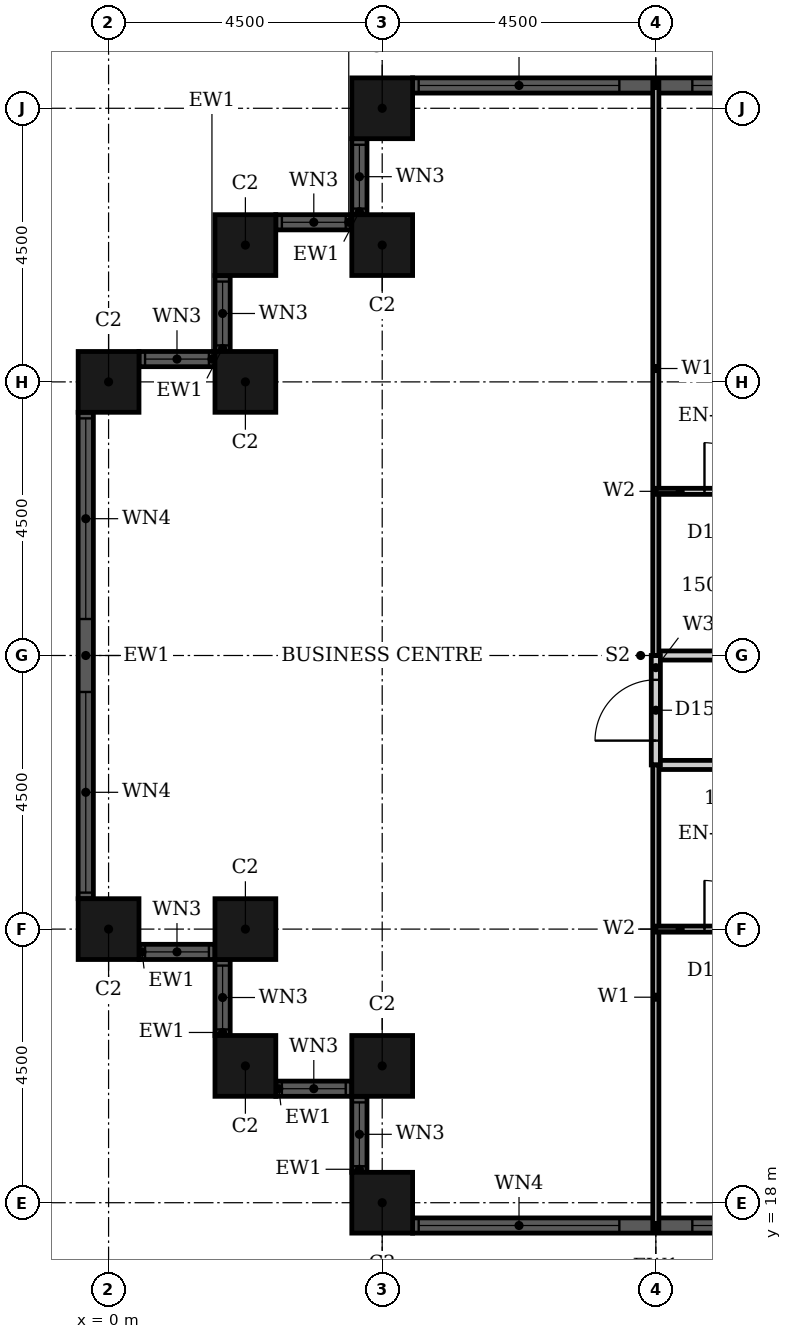
"""IFC4 building model, lengths in metres.
Left out: names, types, materials, properties, quantities, classifications, styles, units other than length and angle.
Written with IfcOpenShell. Run it as: python <this file> out.ifc"""

import sys

from ifc_helpers import new_model, si_unit, direction, frame, frame_2d, origin, origin_2d, place, context, subcontext, project, spatial, rectangle, hollow_rectangle, extrude, element, fill, save


model = new_model("IFC4")
c1 = context("Model", 3, precision=1e-05, world=origin(), true_north=direction((0.0, 1.0)))
c2 = subcontext(c1, "Body", "Model", "MODEL_VIEW")
j1 = project(units=[si_unit("LENGTHUNIT", "METRE"), si_unit("PLANEANGLEUNIT", "RADIAN")], contexts=[c1])
p1 = place(None, origin())
s1 = spatial("IfcSite", under=j1, at=p1, CompositionType="ELEMENT")
p2 = place(p1, origin())
s2 = spatial("IfcBuilding", under=s1, at=p2, CompositionType="ELEMENT")
p3 = place(p2, frame((0.0, 0.0, 67.2)))
s3 = spatial("IfcBuildingStorey", under=s2, at=p3, CompositionType="ELEMENT", Elevation=67.2)
for number, where, z_axis, x_axis in (
    (1, (4.5, 36.0, 0.0), (0.0, 0.0, 1.0), (1.0, 0.0, 0.0)),
    (2, (4.5, 33.75, 0.0), (0.0, 0.0, 1.0), (1.0, 0.0, 0.0)),
    (3, (2.25, 33.75, 0.0), (0.0, 0.0, 1.0), (1.0, 0.0, 0.0)),
    (4, (2.25, 31.5, 0.0), (0.0, 0.0, 1.0), (1.0, 0.0, 0.0)),
    (5, (0.0, 31.5, 0.0), (0.0, 0.0, 1.0), (1.0, 0.0, 0.0)),
    (6, (0.0, 22.5, 0.0), (0.0, 0.0, 1.0), (1.0, 0.0, 0.0)),
    (7, (2.25, 22.5, 0.0), (0.0, 0.0, 1.0), (1.0, 0.0, 0.0)),
    (8, (2.25, 20.25, 0.0), (0.0, 0.0, 1.0), (1.0, 0.0, 0.0)),
    (9, (4.5, 20.25, 0.0), (0.0, 0.0, 1.0), (1.0, 0.0, 0.0)),
    (10, (4.5, 18.0, 0.0), (0.0, 0.0, 1.0), (1.0, 0.0, 0.0)),
):
    element("IfcColumn", number, at=place(p3, frame(where, z_axis=z_axis, x_axis=x_axis)), inside=s3, PredefinedType="COLUMN", context=c2, shape_type="SweptSolid", body=[
        extrude(hollow_rectangle(XDim=1.0, YDim=1.0, WallThickness=0.032, at=origin_2d()), origin(), (0.0, 0.0, 1.0), 3.6),
    ])
p4 = place(p3, frame((13.0, 36.375, 0.0), z_axis=(0.0, 0.0, 1.0), x_axis=(-1.0, 0.0, 0.0)))
e11 = element("IfcWall", 11, at=p4, inside=s3, PredefinedType="SOLIDWALL", context=c2, shape_type="SweptSolid", body=[
    extrude(rectangle(XDim=8.0, YDim=0.25, at=frame_2d((4.0, 0.0))), origin(), (0.0, 0.0, 1.0), 3.6),
])
p5 = place(p4, frame((0.1, 0.0, 0.9)))
e12 = element("IfcOpeningElement", 12, at=p5, cuts=e11, PredefinedType="OPENING", context=c2, shape_type="SweptSolid", body=[
    extrude(rectangle(XDim=3.3, YDim=2.08, at=frame_2d((1.65, 1.04))), frame((0.0, 0.135, 0.0), z_axis=(0.0, -1.0, 0.0), x_axis=(1.0, 0.0, 0.0)), (0.0, 0.0, 1.0), 0.27),
])
p6 = place(p4, frame((4.6, 0.0, 0.9)))
e13 = element("IfcOpeningElement", 13, at=p6, cuts=e11, PredefinedType="OPENING", context=c2, shape_type="SweptSolid", body=[
    extrude(rectangle(XDim=3.3, YDim=2.08, at=frame_2d((1.65, 1.04))), frame((0.0, 0.135, 0.0), z_axis=(0.0, -1.0, 0.0), x_axis=(1.0, 0.0, 0.0)), (0.0, 0.0, 1.0), 0.27),
])
p7 = place(p3, frame((4.125, 35.5, 0.0), z_axis=(0.0, 0.0, 1.0), x_axis=(0.0, -1.0, 0.0)))
e14 = element("IfcWall", 14, at=p7, inside=s3, PredefinedType="SOLIDWALL", context=c2, shape_type="SweptSolid", body=[
    extrude(rectangle(XDim=1.25, YDim=0.25, at=frame_2d((0.625, 0.0))), origin(), (0.0, 0.0, 1.0), 3.6),
])
p8 = place(p7, frame((0.1, 0.0, 0.9)))
e15 = element("IfcOpeningElement", 15, at=p8, cuts=e14, PredefinedType="OPENING", context=c2, shape_type="SweptSolid", body=[
    extrude(rectangle(XDim=1.05, YDim=2.08, at=frame_2d((0.525, 1.04))), frame((0.0, 0.135, 0.0), z_axis=(0.0, -1.0, 0.0), x_axis=(1.0, 0.0, 0.0)), (0.0, 0.0, 1.0), 0.27),
])
p9 = place(p3, frame((4.0, 34.125, 0.0), z_axis=(0.0, 0.0, 1.0), x_axis=(-1.0, 0.0, 0.0)))
e16 = element("IfcWall", 16, at=p9, inside=s3, PredefinedType="SOLIDWALL", context=c2, shape_type="SweptSolid", body=[
    extrude(rectangle(XDim=1.25, YDim=0.25, at=frame_2d((0.625, 0.0))), origin(), (0.0, 0.0, 1.0), 3.6),
])
p10 = place(p9, frame((0.1, 0.0, 0.9)))
e17 = element("IfcOpeningElement", 17, at=p10, cuts=e16, PredefinedType="OPENING", context=c2, shape_type="SweptSolid", body=[
    extrude(rectangle(XDim=1.05, YDim=2.08, at=frame_2d((0.525, 1.04))), frame((0.0, 0.135, 0.0), z_axis=(0.0, -1.0, 0.0), x_axis=(1.0, 0.0, 0.0)), (0.0, 0.0, 1.0), 0.27),
])
p11 = place(p3, frame((1.875, 33.25, 0.0), z_axis=(0.0, 0.0, 1.0), x_axis=(0.0, -1.0, 0.0)))
e18 = element("IfcWall", 18, at=p11, inside=s3, PredefinedType="SOLIDWALL", context=c2, shape_type="SweptSolid", body=[
    extrude(rectangle(XDim=1.25, YDim=0.25, at=frame_2d((0.625, 0.0))), origin(), (0.0, 0.0, 1.0), 3.6),
])
p12 = place(p11, frame((0.1, 0.0, 0.9)))
e19 = element("IfcOpeningElement", 19, at=p12, cuts=e18, PredefinedType="OPENING", context=c2, shape_type="SweptSolid", body=[
    extrude(rectangle(XDim=1.05, YDim=2.08, at=frame_2d((0.525, 1.04))), frame((0.0, 0.135, 0.0), z_axis=(0.0, -1.0, 0.0), x_axis=(1.0, 0.0, 0.0)), (0.0, 0.0, 1.0), 0.27),
])
p13 = place(p3, frame((1.75, 31.875, 0.0), z_axis=(0.0, 0.0, 1.0), x_axis=(-1.0, 0.0, 0.0)))
e20 = element("IfcWall", 20, at=p13, inside=s3, PredefinedType="SOLIDWALL", context=c2, shape_type="SweptSolid", body=[
    extrude(rectangle(XDim=1.25, YDim=0.25, at=frame_2d((0.625, 0.0))), origin(), (0.0, 0.0, 1.0), 3.6),
])
p14 = place(p13, frame((0.1, 0.0, 0.9)))
e21 = element("IfcOpeningElement", 21, at=p14, cuts=e20, PredefinedType="OPENING", context=c2, shape_type="SweptSolid", body=[
    extrude(rectangle(XDim=1.05, YDim=2.08, at=frame_2d((0.525, 1.04))), frame((0.0, 0.135, 0.0), z_axis=(0.0, -1.0, 0.0), x_axis=(1.0, 0.0, 0.0)), (0.0, 0.0, 1.0), 0.27),
])
p15 = place(p3, frame((-0.375, 31.0, 0.0), z_axis=(0.0, 0.0, 1.0), x_axis=(0.0, -1.0, 0.0)))
e22 = element("IfcWall", 22, at=p15, inside=s3, PredefinedType="SOLIDWALL", context=c2, shape_type="SweptSolid", body=[
    extrude(rectangle(XDim=8.0, YDim=0.25, at=frame_2d((4.0, 0.0))), origin(), (0.0, 0.0, 1.0), 3.6),
])
p16 = place(p15, frame((0.1, 0.0, 0.9)))
e23 = element("IfcOpeningElement", 23, at=p16, cuts=e22, PredefinedType="OPENING", context=c2, shape_type="SweptSolid", body=[
    extrude(rectangle(XDim=3.3, YDim=2.08, at=frame_2d((1.65, 1.04))), frame((0.0, 0.135, 0.0), z_axis=(0.0, -1.0, 0.0), x_axis=(1.0, 0.0, 0.0)), (0.0, 0.0, 1.0), 0.27),
])
p17 = place(p15, frame((4.6, 0.0, 0.9)))
e24 = element("IfcOpeningElement", 24, at=p17, cuts=e22, PredefinedType="OPENING", context=c2, shape_type="SweptSolid", body=[
    extrude(rectangle(XDim=3.3, YDim=2.08, at=frame_2d((1.65, 1.04))), frame((0.0, 0.135, 0.0), z_axis=(0.0, -1.0, 0.0), x_axis=(1.0, 0.0, 0.0)), (0.0, 0.0, 1.0), 0.27),
])
p18 = place(p3, frame((0.5, 22.125, 0.0), z_axis=(0.0, 0.0, 1.0), x_axis=(1.0, 0.0, 0.0)))
e25 = element("IfcWall", 25, at=p18, inside=s3, PredefinedType="SOLIDWALL", context=c2, shape_type="SweptSolid", body=[
    extrude(rectangle(XDim=1.25, YDim=0.25, at=frame_2d((0.625, 0.0))), origin(), (0.0, 0.0, 1.0), 3.6),
])
p19 = place(p18, frame((0.1, 0.0, 0.9)))
e26 = element("IfcOpeningElement", 26, at=p19, cuts=e25, PredefinedType="OPENING", context=c2, shape_type="SweptSolid", body=[
    extrude(rectangle(XDim=1.05, YDim=2.08, at=frame_2d((0.525, 1.04))), frame((0.0, 0.135, 0.0), z_axis=(0.0, -1.0, 0.0), x_axis=(1.0, 0.0, 0.0)), (0.0, 0.0, 1.0), 0.27),
])
p20 = place(p3, frame((1.875, 22.0, 0.0), z_axis=(0.0, 0.0, 1.0), x_axis=(0.0, -1.0, 0.0)))
e27 = element("IfcWall", 27, at=p20, inside=s3, PredefinedType="SOLIDWALL", context=c2, shape_type="SweptSolid", body=[
    extrude(rectangle(XDim=1.25, YDim=0.25, at=frame_2d((0.625, 0.0))), origin(), (0.0, 0.0, 1.0), 3.6),
])
p21 = place(p20, frame((0.1, 0.0, 0.9)))
e28 = element("IfcOpeningElement", 28, at=p21, cuts=e27, PredefinedType="OPENING", context=c2, shape_type="SweptSolid", body=[
    extrude(rectangle(XDim=1.05, YDim=2.08, at=frame_2d((0.525, 1.04))), frame((0.0, 0.135, 0.0), z_axis=(0.0, -1.0, 0.0), x_axis=(1.0, 0.0, 0.0)), (0.0, 0.0, 1.0), 0.27),
])
p22 = place(p3, frame((2.75, 19.875, 0.0), z_axis=(0.0, 0.0, 1.0), x_axis=(1.0, 0.0, 0.0)))
e29 = element("IfcWall", 29, at=p22, inside=s3, PredefinedType="SOLIDWALL", context=c2, shape_type="SweptSolid", body=[
    extrude(rectangle(XDim=1.25, YDim=0.25, at=frame_2d((0.625, 0.0))), origin(), (0.0, 0.0, 1.0), 3.6),
])
p23 = place(p22, frame((0.1, 0.0, 0.9)))
e30 = element("IfcOpeningElement", 30, at=p23, cuts=e29, PredefinedType="OPENING", context=c2, shape_type="SweptSolid", body=[
    extrude(rectangle(XDim=1.05, YDim=2.08, at=frame_2d((0.525, 1.04))), frame((0.0, 0.135, 0.0), z_axis=(0.0, -1.0, 0.0), x_axis=(1.0, 0.0, 0.0)), (0.0, 0.0, 1.0), 0.27),
])
p24 = place(p3, frame((4.125, 19.75, 0.0), z_axis=(0.0, 0.0, 1.0), x_axis=(0.0, -1.0, 0.0)))
e31 = element("IfcWall", 31, at=p24, inside=s3, PredefinedType="SOLIDWALL", context=c2, shape_type="SweptSolid", body=[
    extrude(rectangle(XDim=1.25, YDim=0.25, at=frame_2d((0.625, 0.0))), origin(), (0.0, 0.0, 1.0), 3.6),
])
p25 = place(p24, frame((0.1, 0.0, 0.9)))
e32 = element("IfcOpeningElement", 32, at=p25, cuts=e31, PredefinedType="OPENING", context=c2, shape_type="SweptSolid", body=[
    extrude(rectangle(XDim=1.05, YDim=2.08, at=frame_2d((0.525, 1.04))), frame((0.0, 0.135, 0.0), z_axis=(0.0, -1.0, 0.0), x_axis=(1.0, 0.0, 0.0)), (0.0, 0.0, 1.0), 0.27),
])
p26 = place(p3, frame((5.0, 17.625, 0.0), z_axis=(0.0, 0.0, 1.0), x_axis=(1.0, 0.0, 0.0)))
e33 = element("IfcWall", 33, at=p26, inside=s3, PredefinedType="SOLIDWALL", context=c2, shape_type="SweptSolid", body=[
    extrude(rectangle(XDim=8.0, YDim=0.25, at=frame_2d((4.0, 0.0))), origin(), (0.0, 0.0, 1.0), 3.6),
])
p27 = place(p26, frame((0.1, 0.0, 0.9)))
e34 = element("IfcOpeningElement", 34, at=p27, cuts=e33, PredefinedType="OPENING", context=c2, shape_type="SweptSolid", body=[
    extrude(rectangle(XDim=3.3, YDim=2.08, at=frame_2d((1.65, 1.04))), frame((0.0, 0.135, 0.0), z_axis=(0.0, -1.0, 0.0), x_axis=(1.0, 0.0, 0.0)), (0.0, 0.0, 1.0), 0.27),
])
p28 = place(p26, frame((4.6, 0.0, 0.9)))
e35 = element("IfcOpeningElement", 35, at=p28, cuts=e33, PredefinedType="OPENING", context=c2, shape_type="SweptSolid", body=[
    extrude(rectangle(XDim=3.3, YDim=2.08, at=frame_2d((1.65, 1.04))), frame((0.0, 0.135, 0.0), z_axis=(0.0, -1.0, 0.0), x_axis=(1.0, 0.0, 0.0)), (0.0, 0.0, 1.0), 0.27),
])
p29 = place(p3, frame((9.0, 25.2, 0.0), z_axis=(0.0, 0.0, 1.0), x_axis=(1.0, 0.0, 0.0)))
e36 = element("IfcWall", 36, at=p29, inside=s3, PredefinedType="PARTITIONING", context=c2, shape_type="SweptSolid", body=[
    extrude(rectangle(XDim=7.2, YDim=0.15, at=frame_2d((3.6, 0.0))), origin(), (0.0, 0.0, 1.0), 3.3),
])
p30 = place(p29, frame((2.95, 0.0, 0.0)))
e37 = element("IfcOpeningElement", 37, at=p30, cuts=e36, PredefinedType="OPENING", context=c2, shape_type="SweptSolid", body=[
    extrude(rectangle(XDim=1.0, YDim=2.1, at=frame_2d((0.5, 1.05))), frame((0.0, 0.085, 0.0), z_axis=(0.0, -1.0, 0.0), x_axis=(1.0, 0.0, 0.0)), (0.0, 0.0, 1.0), 0.17),
])
p31 = place(p3, frame((9.0, 27.0, 0.0), z_axis=(0.0, 0.0, 1.0), x_axis=(1.0, 0.0, 0.0)))
e38 = element("IfcWall", 38, at=p31, inside=s3, PredefinedType="PARTITIONING", context=c2, shape_type="SweptSolid", body=[
    extrude(rectangle(XDim=7.2, YDim=0.15, at=frame_2d((3.6, 0.0))), origin(), (0.0, 0.0, 1.0), 2.58),
])
p32 = place(p31, frame((2.95, 0.0, 0.0)))
e39 = element("IfcOpeningElement", 39, at=p32, cuts=e38, PredefinedType="OPENING", context=c2, shape_type="SweptSolid", body=[
    extrude(rectangle(XDim=1.0, YDim=2.1, at=frame_2d((0.5, 1.05))), frame((0.0, 0.085, 0.0), z_axis=(0.0, -1.0, 0.0), x_axis=(1.0, 0.0, 0.0)), (0.0, 0.0, 1.0), 0.17),
])
p33 = place(p3, frame((9.0, 25.2, 0.0), z_axis=(0.0, 0.0, 1.0), x_axis=(0.0, 1.0, 0.0)))
e40 = element("IfcWall", 40, at=p33, inside=s3, PredefinedType="PARTITIONING", context=c2, shape_type="SweptSolid", body=[
    extrude(rectangle(XDim=1.8, YDim=0.15, at=frame_2d((0.9, 0.0))), origin(), (0.0, 0.0, 1.0), 3.3),
])
p34 = place(p33, frame((0.4, 0.0, 0.0)))
e41 = element("IfcOpeningElement", 41, at=p34, cuts=e40, PredefinedType="OPENING", context=c2, shape_type="SweptSolid", body=[
    extrude(rectangle(XDim=1.0, YDim=2.1, at=frame_2d((0.5, 1.05))), frame((0.0, 0.085, 0.0), z_axis=(0.0, -1.0, 0.0), x_axis=(1.0, 0.0, 0.0)), (0.0, 0.0, 1.0), 0.17),
])
p35 = place(p3, frame((9.0, 27.0, 0.0), z_axis=(0.0, 0.0, 1.0), x_axis=(0.0, 1.0, 0.0)))
e42 = element("IfcWall", 42, at=p35, inside=s3, PredefinedType="PARTITIONING", context=c2, shape_type="SweptSolid", body=[
    extrude(rectangle(XDim=9.44, YDim=0.1, at=frame_2d((4.72, 0.0))), origin(), (0.0, 0.0, 1.0), 3.3),
])
p36 = place(p3, frame((9.0, 17.56, 0.0), z_axis=(0.0, 0.0, 1.0), x_axis=(0.0, 1.0, 0.0)))
e43 = element("IfcWall", 43, at=p36, inside=s3, PredefinedType="PARTITIONING", context=c2, shape_type="SweptSolid", body=[
    extrude(rectangle(XDim=7.64, YDim=0.1, at=frame_2d((3.82, 0.0))), origin(), (0.0, 0.0, 1.0), 3.3),
])
p37 = place(p3, frame((9.0, 22.5, 0.0), z_axis=(0.0, 0.0, 1.0), x_axis=(1.0, 0.0, 0.0)))
e44 = element("IfcWall", 44, at=p37, inside=s3, PredefinedType="PARTITIONING", context=c2, shape_type="SweptSolid", body=[
    extrude(rectangle(XDim=2.4, YDim=0.1, at=frame_2d((1.2, 0.0))), origin(), (0.0, 0.0, 1.0), 2.58),
])
p38 = place(p37, frame((0.8, 0.0, 0.0)))
e45 = element("IfcOpeningElement", 45, at=p38, cuts=e44, PredefinedType="OPENING", context=c2, shape_type="SweptSolid", body=[
    extrude(rectangle(XDim=0.8, YDim=2.1, at=frame_2d((0.4, 1.05))), frame((0.0, 0.06, 0.0), z_axis=(0.0, -1.0, 0.0), x_axis=(1.0, 0.0, 0.0)), (0.0, 0.0, 1.0), 0.12),
])
p39 = place(p3, frame((9.0, 29.7, 0.0), z_axis=(0.0, 0.0, 1.0), x_axis=(1.0, 0.0, 0.0)))
e46 = element("IfcWall", 46, at=p39, inside=s3, PredefinedType="PARTITIONING", context=c2, shape_type="SweptSolid", body=[
    extrude(rectangle(XDim=2.4, YDim=0.1, at=frame_2d((1.2, 0.0))), origin(), (0.0, 0.0, 1.0), 3.3),
])
p40 = place(p39, frame((0.8, 0.0, 0.0)))
e47 = element("IfcOpeningElement", 47, at=p40, cuts=e46, PredefinedType="OPENING", context=c2, shape_type="SweptSolid", body=[
    extrude(rectangle(XDim=0.8, YDim=2.1, at=frame_2d((0.4, 1.05))), frame((0.0, 0.06, 0.0), z_axis=(0.0, -1.0, 0.0), x_axis=(1.0, 0.0, 0.0)), (0.0, 0.0, 1.0), 0.12),
])
p41 = place(p5, origin())
e48 = element("IfcWindow", 48, at=p41, inside=s3, PartitioningType="SINGLE_PANEL", PredefinedType="WINDOW", context=c2, shape_type="SweptSolid", body=[
    extrude(rectangle(XDim=3.3, YDim=2.08, at=frame_2d((1.65, 1.04))), frame((0.0, 0.03, 0.0), z_axis=(0.0, -1.0, 0.0), x_axis=(1.0, 0.0, 0.0)), (0.0, 0.0, 1.0), 0.06),
])
fill(e12, e48)
p42 = place(p6, origin())
e49 = element("IfcWindow", 49, at=p42, inside=s3, PartitioningType="SINGLE_PANEL", PredefinedType="WINDOW", context=c2, shape_type="SweptSolid", body=[
    extrude(rectangle(XDim=3.3, YDim=2.08, at=frame_2d((1.65, 1.04))), frame((0.0, 0.03, 0.0), z_axis=(0.0, -1.0, 0.0), x_axis=(1.0, 0.0, 0.0)), (0.0, 0.0, 1.0), 0.06),
])
fill(e13, e49)
p43 = place(p8, origin())
e50 = element("IfcWindow", 50, at=p43, inside=s3, PartitioningType="SINGLE_PANEL", PredefinedType="WINDOW", context=c2, shape_type="SweptSolid", body=[
    extrude(rectangle(XDim=1.05, YDim=2.08, at=frame_2d((0.525, 1.04))), frame((0.0, 0.03, 0.0), z_axis=(0.0, -1.0, 0.0), x_axis=(1.0, 0.0, 0.0)), (0.0, 0.0, 1.0), 0.06),
])
fill(e15, e50)
p44 = place(p10, origin())
e51 = element("IfcWindow", 51, at=p44, inside=s3, PartitioningType="SINGLE_PANEL", PredefinedType="WINDOW", context=c2, shape_type="SweptSolid", body=[
    extrude(rectangle(XDim=1.05, YDim=2.08, at=frame_2d((0.525, 1.04))), frame((0.0, 0.03, 0.0), z_axis=(0.0, -1.0, 0.0), x_axis=(1.0, 0.0, 0.0)), (0.0, 0.0, 1.0), 0.06),
])
fill(e17, e51)
p45 = place(p12, origin())
e52 = element("IfcWindow", 52, at=p45, inside=s3, PartitioningType="SINGLE_PANEL", PredefinedType="WINDOW", context=c2, shape_type="SweptSolid", body=[
    extrude(rectangle(XDim=1.05, YDim=2.08, at=frame_2d((0.525, 1.04))), frame((0.0, 0.03, 0.0), z_axis=(0.0, -1.0, 0.0), x_axis=(1.0, 0.0, 0.0)), (0.0, 0.0, 1.0), 0.06),
])
fill(e19, e52)
p46 = place(p14, origin())
e53 = element("IfcWindow", 53, at=p46, inside=s3, PartitioningType="SINGLE_PANEL", PredefinedType="WINDOW", context=c2, shape_type="SweptSolid", body=[
    extrude(rectangle(XDim=1.05, YDim=2.08, at=frame_2d((0.525, 1.04))), frame((0.0, 0.03, 0.0), z_axis=(0.0, -1.0, 0.0), x_axis=(1.0, 0.0, 0.0)), (0.0, 0.0, 1.0), 0.06),
])
fill(e21, e53)
p47 = place(p16, origin())
e54 = element("IfcWindow", 54, at=p47, inside=s3, PartitioningType="SINGLE_PANEL", PredefinedType="WINDOW", context=c2, shape_type="SweptSolid", body=[
    extrude(rectangle(XDim=3.3, YDim=2.08, at=frame_2d((1.65, 1.04))), frame((0.0, 0.03, 0.0), z_axis=(0.0, -1.0, 0.0), x_axis=(1.0, 0.0, 0.0)), (0.0, 0.0, 1.0), 0.06),
])
fill(e23, e54)
p48 = place(p17, origin())
e55 = element("IfcWindow", 55, at=p48, inside=s3, PartitioningType="SINGLE_PANEL", PredefinedType="WINDOW", context=c2, shape_type="SweptSolid", body=[
    extrude(rectangle(XDim=3.3, YDim=2.08, at=frame_2d((1.65, 1.04))), frame((0.0, 0.03, 0.0), z_axis=(0.0, -1.0, 0.0), x_axis=(1.0, 0.0, 0.0)), (0.0, 0.0, 1.0), 0.06),
])
fill(e24, e55)
p49 = place(p19, origin())
e56 = element("IfcWindow", 56, at=p49, inside=s3, PartitioningType="SINGLE_PANEL", PredefinedType="WINDOW", context=c2, shape_type="SweptSolid", body=[
    extrude(rectangle(XDim=1.05, YDim=2.08, at=frame_2d((0.525, 1.04))), frame((0.0, 0.03, 0.0), z_axis=(0.0, -1.0, 0.0), x_axis=(1.0, 0.0, 0.0)), (0.0, 0.0, 1.0), 0.06),
])
fill(e26, e56)
p50 = place(p21, origin())
e57 = element("IfcWindow", 57, at=p50, inside=s3, PartitioningType="SINGLE_PANEL", PredefinedType="WINDOW", context=c2, shape_type="SweptSolid", body=[
    extrude(rectangle(XDim=1.05, YDim=2.08, at=frame_2d((0.525, 1.04))), frame((0.0, 0.03, 0.0), z_axis=(0.0, -1.0, 0.0), x_axis=(1.0, 0.0, 0.0)), (0.0, 0.0, 1.0), 0.06),
])
fill(e28, e57)
p51 = place(p23, origin())
e58 = element("IfcWindow", 58, at=p51, inside=s3, PartitioningType="SINGLE_PANEL", PredefinedType="WINDOW", context=c2, shape_type="SweptSolid", body=[
    extrude(rectangle(XDim=1.05, YDim=2.08, at=frame_2d((0.525, 1.04))), frame((0.0, 0.03, 0.0), z_axis=(0.0, -1.0, 0.0), x_axis=(1.0, 0.0, 0.0)), (0.0, 0.0, 1.0), 0.06),
])
fill(e30, e58)
p52 = place(p25, origin())
e59 = element("IfcWindow", 59, at=p52, inside=s3, PartitioningType="SINGLE_PANEL", PredefinedType="WINDOW", context=c2, shape_type="SweptSolid", body=[
    extrude(rectangle(XDim=1.05, YDim=2.08, at=frame_2d((0.525, 1.04))), frame((0.0, 0.03, 0.0), z_axis=(0.0, -1.0, 0.0), x_axis=(1.0, 0.0, 0.0)), (0.0, 0.0, 1.0), 0.06),
])
fill(e32, e59)
p53 = place(p27, origin())
e60 = element("IfcWindow", 60, at=p53, inside=s3, PartitioningType="SINGLE_PANEL", PredefinedType="WINDOW", context=c2, shape_type="SweptSolid", body=[
    extrude(rectangle(XDim=3.3, YDim=2.08, at=frame_2d((1.65, 1.04))), frame((0.0, 0.03, 0.0), z_axis=(0.0, -1.0, 0.0), x_axis=(1.0, 0.0, 0.0)), (0.0, 0.0, 1.0), 0.06),
])
fill(e34, e60)
p54 = place(p28, origin())
e61 = element("IfcWindow", 61, at=p54, inside=s3, PartitioningType="SINGLE_PANEL", PredefinedType="WINDOW", context=c2, shape_type="SweptSolid", body=[
    extrude(rectangle(XDim=3.3, YDim=2.08, at=frame_2d((1.65, 1.04))), frame((0.0, 0.03, 0.0), z_axis=(0.0, -1.0, 0.0), x_axis=(1.0, 0.0, 0.0)), (0.0, 0.0, 1.0), 0.06),
])
fill(e35, e61)
p55 = place(p38, origin())
e62 = element("IfcDoor", 62, at=p55, inside=s3, OperationType="SINGLE_SWING_LEFT", PredefinedType="DOOR", context=c2, shape_type="SweptSolid", body=[
    extrude(rectangle(XDim=0.8, YDim=2.1, at=frame_2d((0.4, 1.05))), frame((0.0, 0.025, 0.0), z_axis=(0.0, -1.0, 0.0), x_axis=(1.0, 0.0, 0.0)), (0.0, 0.0, 1.0), 0.05),
])
fill(e45, e62)
p56 = place(p40, origin())
e63 = element("IfcDoor", 63, at=p56, inside=s3, OperationType="SINGLE_SWING_LEFT", PredefinedType="DOOR", context=c2, shape_type="SweptSolid", body=[
    extrude(rectangle(XDim=0.8, YDim=2.1, at=frame_2d((0.4, 1.05))), frame((0.0, 0.025, 0.0), z_axis=(0.0, -1.0, 0.0), x_axis=(1.0, 0.0, 0.0)), (0.0, 0.0, 1.0), 0.05),
])
fill(e47, e63)
p57 = place(p34, origin())
e64 = element("IfcDoor", 64, at=p57, inside=s3, OperationType="SINGLE_SWING_LEFT", PredefinedType="DOOR", context=c2, shape_type="SweptSolid", body=[
    extrude(rectangle(XDim=1.0, YDim=2.1, at=frame_2d((0.5, 1.05))), frame((0.0, 0.025, 0.0), z_axis=(0.0, -1.0, 0.0), x_axis=(1.0, 0.0, 0.0)), (0.0, 0.0, 1.0), 0.05),
])
fill(e41, e64)
save(model, sys.argv[1])
